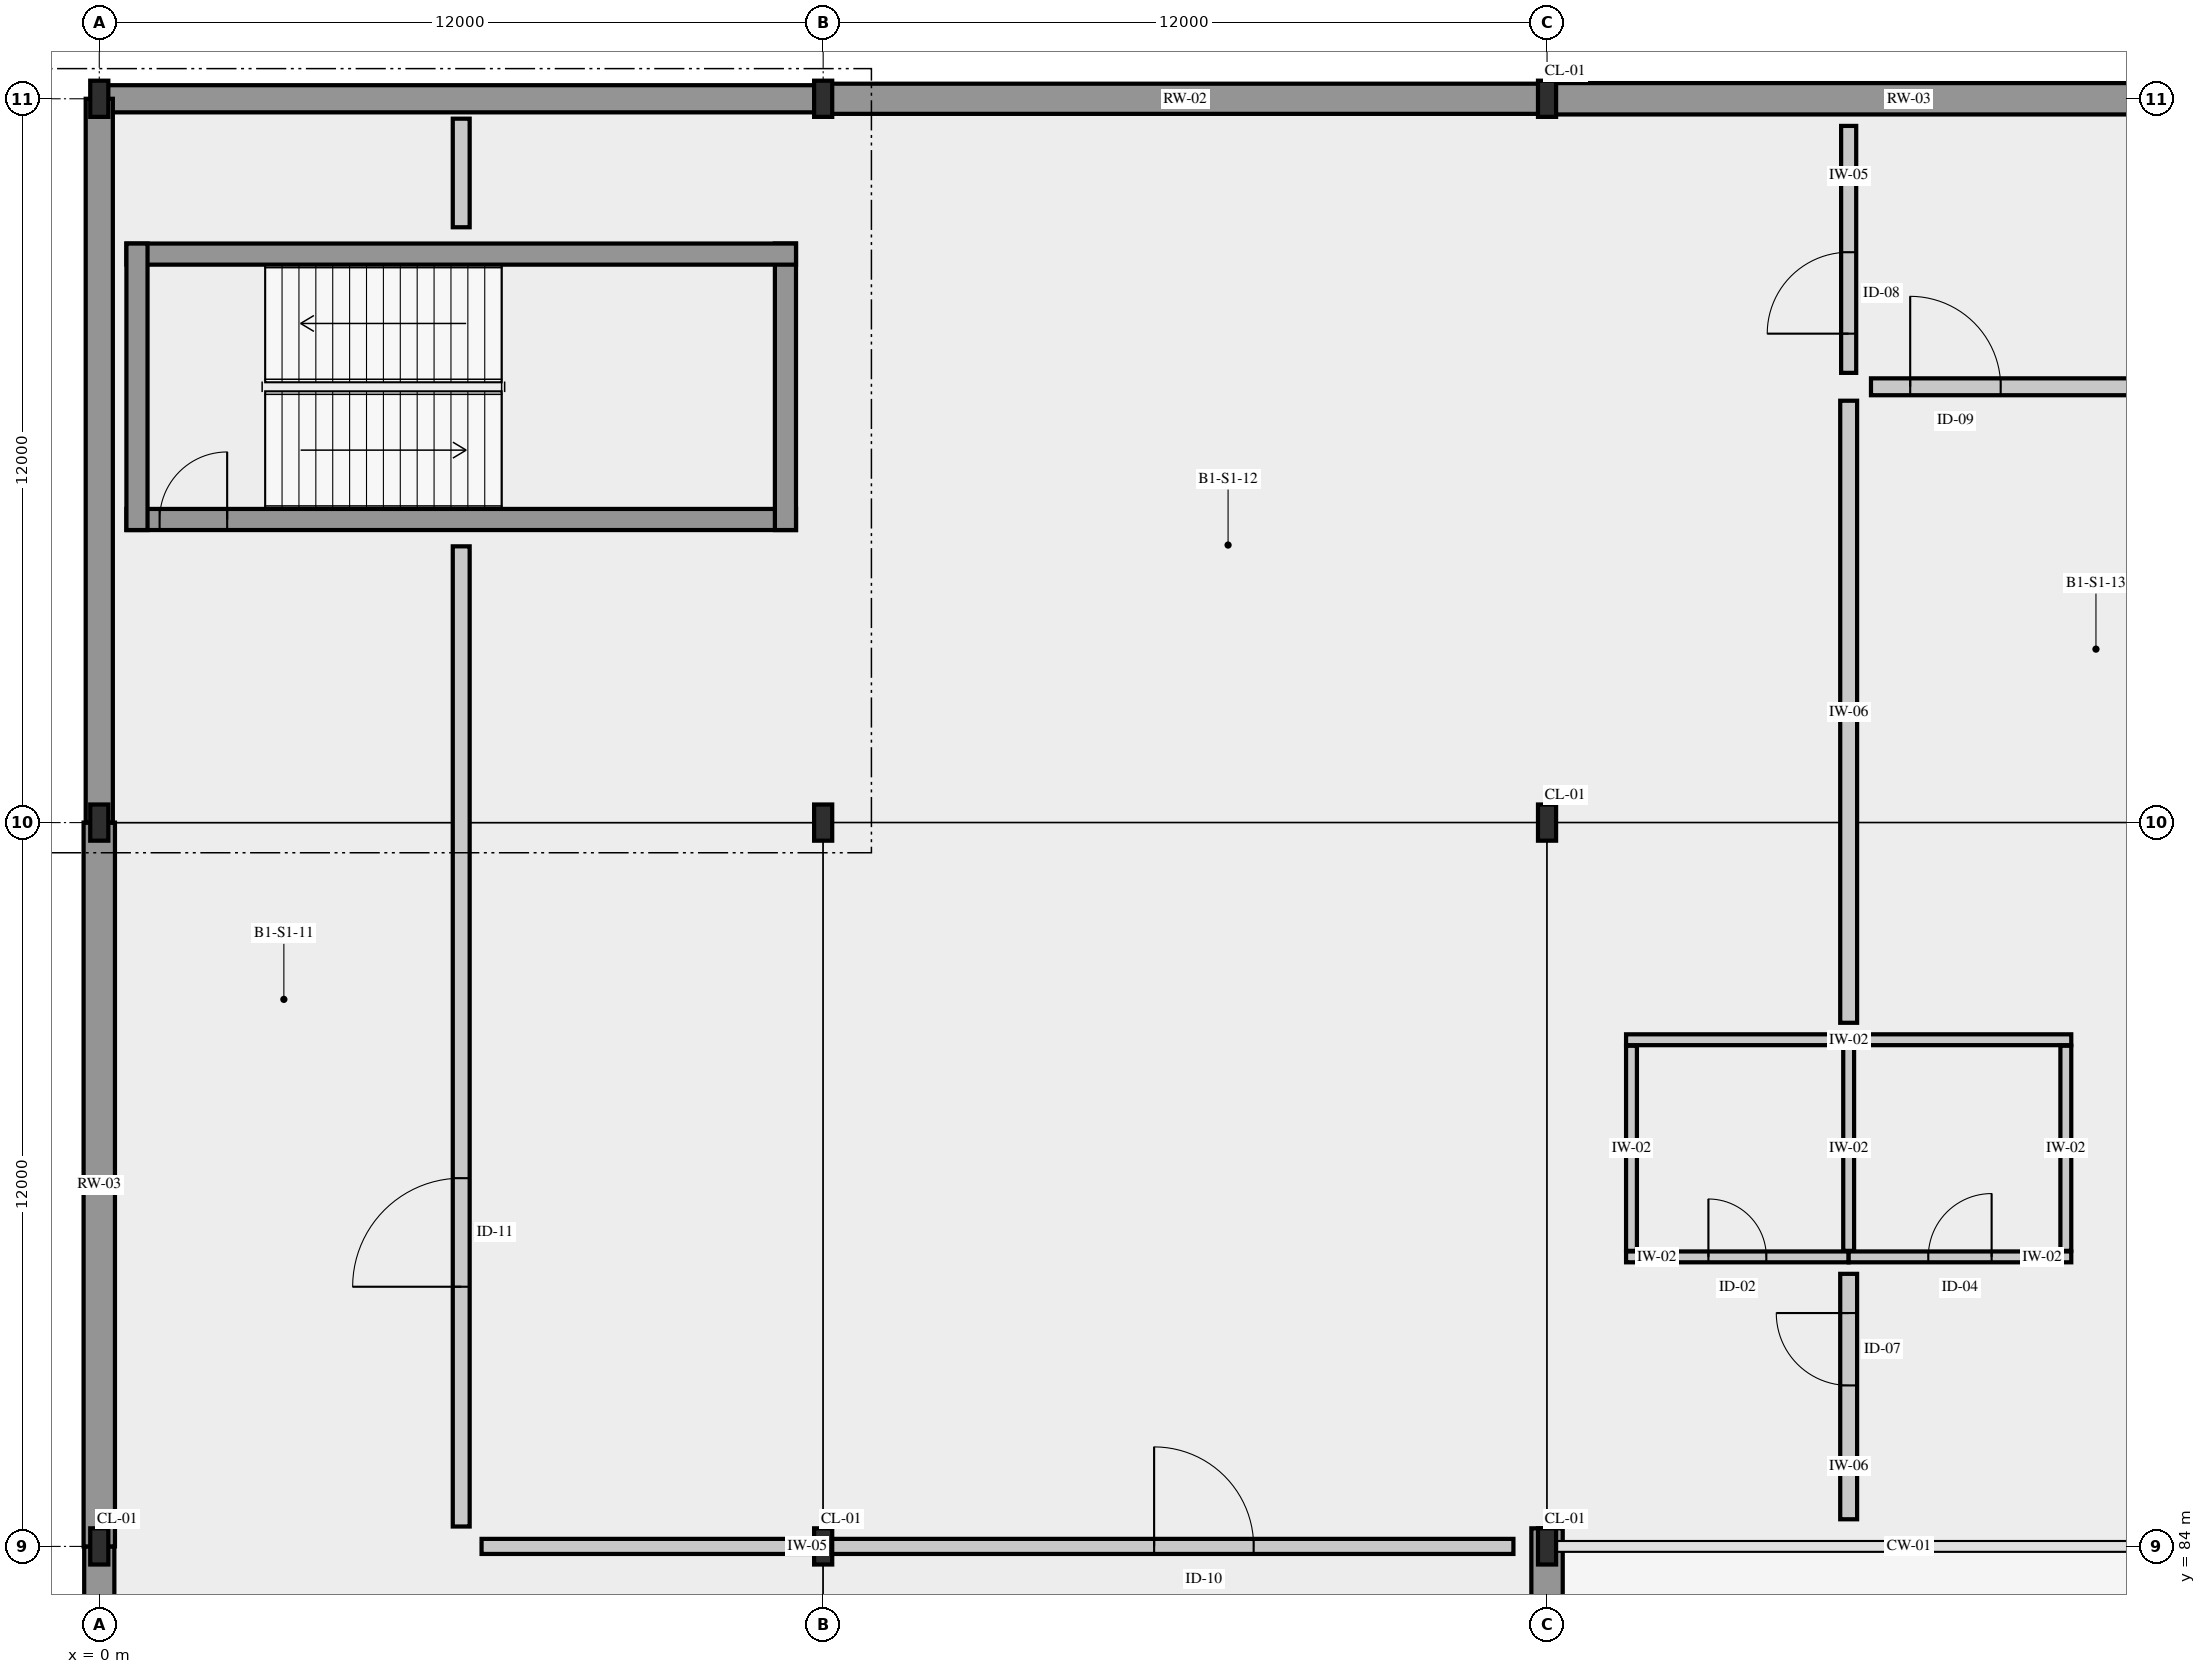
"""IFC4 building model, lengths in metres.
Left out: names, types, materials, properties, quantities, classifications, styles, units other than length and angle.
Written with IfcOpenShell. Run it as: python <this file> out.ifc"""

import sys

from ifc_helpers import new_model, si_unit, direction, frame, frame_2d, origin, origin_2d, place, context, subcontext, project, spatial, rectangle, i_section, extrude, element, fill, save


model = new_model("IFC4")
c1 = context("Model", 3, precision=1e-05, world=origin(), true_north=direction((0.0, 1.0)))
c2 = subcontext(c1, "Body", "Model", "MODEL_VIEW")
j1 = project(units=[si_unit("LENGTHUNIT", "METRE"), si_unit("PLANEANGLEUNIT", "RADIAN")], contexts=[c1])
p1 = place(None, origin())
s1 = spatial("IfcSite", under=j1, at=p1, CompositionType="ELEMENT")
p2 = place(p1, origin())
s2 = spatial("IfcBuilding", under=s1, at=p2, CompositionType="ELEMENT")
p3 = place(p2, frame((0.0, 0.0, -5.4)))
s3 = spatial("IfcBuildingStorey", under=s2, at=p3, CompositionType="ELEMENT", Elevation=-5.4)
for number, where, z_axis, x_axis in (
    (1, (0.0, 84.0, 0.0), (0.0, 0.0, 1.0), (1.0, 0.0, 0.0)),
    (2, (0.0, 96.0, 0.0), (0.0, 0.0, 1.0), (1.0, 0.0, 0.0)),
    (3, (0.0, 108.0, 0.0), (0.0, 0.0, 1.0), (1.0, 0.0, 0.0)),
    (4, (12.0, 84.0, 0.0), (0.0, 0.0, 1.0), (1.0, 0.0, 0.0)),
    (5, (12.0, 96.0, 0.0), (0.0, 0.0, 1.0), (1.0, 0.0, 0.0)),
    (6, (12.0, 108.0, 0.0), (0.0, 0.0, 1.0), (1.0, 0.0, 0.0)),
    (7, (24.0, 84.0, 0.0), (0.0, 0.0, 1.0), (1.0, 0.0, 0.0)),
    (8, (24.0, 96.0, 0.0), (0.0, 0.0, 1.0), (1.0, 0.0, 0.0)),
    (9, (24.0, 108.0, 0.0), (0.0, 0.0, 1.0), (1.0, 0.0, 0.0)),
):
    element("IfcColumn", number, at=place(p3, frame(where, z_axis=z_axis, x_axis=x_axis)), inside=s3, PredefinedType="COLUMN", context=c2, shape_type="SweptSolid", body=[
        extrude(i_section(OverallWidth=0.3, OverallDepth=0.6, WebThickness=0.015, FlangeThickness=0.03, FilletRadius=0.027, at=origin_2d()), origin(), (0.0, 0.0, 1.0), 5.4),
    ])
p4 = place(p3, frame((0.0, 84.0, 0.0), z_axis=(0.0, 0.0, 1.0), x_axis=(0.0, -1.0, 0.0)))
e10 = element("IfcWall", 10, at=p4, inside=s3, PredefinedType="USERDEFINED", context=c2, shape_type="SweptSolid", body=[
    extrude(rectangle(XDim=9.6, YDim=0.5, at=frame_2d((4.8, 0.0))), origin(), (0.0, 0.0, 1.0), 4.54),
])
p5 = place(p3, frame((0.0, 96.0, 0.0), z_axis=(0.0, 0.0, 1.0), x_axis=(0.0, -1.0, 0.0)))
e11 = element("IfcWall", 11, at=p5, inside=s3, PredefinedType="USERDEFINED", context=c2, shape_type="SweptSolid", body=[
    extrude(rectangle(XDim=12.0, YDim=0.52, at=frame_2d((6.0, 0.0))), origin(), (0.0, 0.0, 1.0), 4.54),
])
for number, where, z_axis, x_axis in (
    (12, (12.0, 108.0, 0.0), (0.0, 0.0, 1.0), (-1.0, 0.0, 0.0)),
    (13, (0.0, 108.0, 0.0), (0.0, 0.0, 1.0), (0.0, -1.0, 0.0)),
):
    element("IfcWall", number, at=place(p3, frame(where, z_axis=z_axis, x_axis=x_axis)), inside=s3, PredefinedType="USERDEFINED", context=c2, shape_type="SweptSolid", body=[
        extrude(rectangle(XDim=12.0, YDim=0.45, at=frame_2d((6.0, 0.0))), origin(), (0.0, 0.0, 1.0), 4.54),
    ])
p6 = place(p3, frame((24.0, 74.4, 0.0), z_axis=(0.0, 0.0, 1.0), x_axis=(0.0, 1.0, 0.0)))
e14 = element("IfcWall", 14, at=p6, inside=s3, PredefinedType="USERDEFINED", context=c2, shape_type="SweptSolid", body=[
    extrude(rectangle(XDim=9.9, YDim=0.52, at=frame_2d((4.95, 0.0))), origin(), (0.0, 0.0, 1.0), 4.54),
])
p7 = place(p3, frame((24.0, 108.0, 0.0), z_axis=(0.0, 0.0, 1.0), x_axis=(-1.0, 0.0, 0.0)))
e15 = element("IfcWall", 15, at=p7, inside=s3, PredefinedType="USERDEFINED", context=c2, shape_type="SweptSolid", body=[
    extrude(rectangle(XDim=12.0, YDim=0.5, at=frame_2d((6.0, 0.0))), origin(), (0.0, 0.0, 1.0), 4.54),
])
p8 = place(p3, frame((36.0, 108.0, 0.0), z_axis=(0.0, 0.0, 1.0), x_axis=(-1.0, 0.0, 0.0)))
e16 = element("IfcWall", 16, at=p8, inside=s3, PredefinedType="USERDEFINED", context=c2, shape_type="SweptSolid", body=[
    extrude(rectangle(XDim=12.0, YDim=0.52, at=frame_2d((6.0, 0.0))), origin(), (0.0, 0.0, 1.0), 4.54),
])
p9 = place(p3, frame((0.45, 101.025, 0.0), z_axis=(0.0, 0.0, 1.0), x_axis=(1.0, 0.0, 0.0)))
e17 = element("IfcWall", 17, at=p9, inside=s3, PredefinedType="SHEAR", context=c2, shape_type="SweptSolid", body=[
    extrude(rectangle(XDim=11.1, YDim=0.35, at=frame_2d((5.55, 0.0))), origin(), (0.0, 0.0, 1.0), 5.12),
])
p10 = place(p9, frame((0.55, 0.0, 0.0)))
e18 = element("IfcOpeningElement", 18, at=p10, cuts=e17, PredefinedType="OPENING", context=c2, shape_type="SweptSolid", body=[
    extrude(rectangle(XDim=1.12, YDim=2.2, at=frame_2d((0.56, 1.1))), frame((0.0, 0.185, 0.0), z_axis=(0.0, -1.0, 0.0), x_axis=(1.0, 0.0, 0.0)), (0.0, 0.0, 1.0), 0.37),
])
p11 = place(p3, frame((11.375, 100.85, 0.0), z_axis=(0.0, 0.0, 1.0), x_axis=(0.0, 1.0, 0.0)))
e19 = element("IfcWall", 19, at=p11, inside=s3, PredefinedType="SHEAR", context=c2, shape_type="SweptSolid", body=[
    extrude(rectangle(XDim=4.75, YDim=0.35, at=frame_2d((2.375, 0.0))), origin(), (0.0, 0.0, 1.0), 5.12),
])
p12 = place(p3, frame((11.55, 105.425, 0.0), z_axis=(0.0, 0.0, 1.0), x_axis=(-1.0, 0.0, 0.0)))
e20 = element("IfcWall", 20, at=p12, inside=s3, PredefinedType="SHEAR", context=c2, shape_type="SweptSolid", body=[
    extrude(rectangle(XDim=11.1, YDim=0.35, at=frame_2d((5.55, 0.0))), origin(), (0.0, 0.0, 1.0), 5.12),
])
p13 = place(p3, frame((0.625, 105.6, 0.0), z_axis=(0.0, 0.0, 1.0), x_axis=(0.0, -1.0, 0.0)))
e21 = element("IfcWall", 21, at=p13, inside=s3, PredefinedType="SHEAR", context=c2, shape_type="SweptSolid", body=[
    extrude(rectangle(XDim=4.75, YDim=0.35, at=frame_2d((2.375, 0.0))), origin(), (0.0, 0.0, 1.0), 5.12),
])
p14 = place(p3, frame((25.31, 92.4, 0.0), z_axis=(0.0, 0.0, 1.0), x_axis=(1.0, 0.0, 0.0)))
e22 = element("IfcWall", 22, at=p14, inside=s3, PredefinedType="PARTITIONING", context=c2, shape_type="SweptSolid", body=[
    extrude(rectangle(XDim=7.38, YDim=0.18, at=frame_2d((3.69, 0.0))), origin(), (0.0, 0.0, 1.0), 4.65),
])
p15 = place(p3, frame((25.31, 88.8, 0.0), z_axis=(0.0, 0.0, 1.0), x_axis=(1.0, 0.0, 0.0)))
e23 = element("IfcWall", 23, at=p15, inside=s3, PredefinedType="PARTITIONING", context=c2, shape_type="SweptSolid", body=[
    extrude(rectangle(XDim=3.69, YDim=0.18, at=frame_2d((1.845, 0.0))), origin(), (0.0, 0.0, 1.0), 4.65),
])
p16 = place(p15, frame((1.365, 0.0, 0.0)))
e24 = element("IfcOpeningElement", 24, at=p16, cuts=e23, PredefinedType="OPENING", context=c2, shape_type="SweptSolid", body=[
    extrude(rectangle(XDim=0.96, YDim=2.15, at=frame_2d((0.48, 1.075))), frame((0.0, 0.1, 0.0), z_axis=(0.0, -1.0, 0.0), x_axis=(1.0, 0.0, 0.0)), (0.0, 0.0, 1.0), 0.2),
])
p17 = place(p3, frame((29.0, 88.8, 0.0), z_axis=(0.0, 0.0, 1.0), x_axis=(1.0, 0.0, 0.0)))
e25 = element("IfcWall", 25, at=p17, inside=s3, PredefinedType="PARTITIONING", context=c2, shape_type="SweptSolid", body=[
    extrude(rectangle(XDim=3.69, YDim=0.18, at=frame_2d((1.845, 0.0))), origin(), (0.0, 0.0, 1.0), 4.65),
])
p18 = place(p17, frame((1.32, 0.0, 0.0)))
e26 = element("IfcOpeningElement", 26, at=p18, cuts=e25, PredefinedType="OPENING", context=c2, shape_type="SweptSolid", body=[
    extrude(rectangle(XDim=1.05, YDim=2.2, at=frame_2d((0.525, 1.1))), frame((0.0, 0.1, 0.0), z_axis=(0.0, -1.0, 0.0), x_axis=(1.0, 0.0, 0.0)), (0.0, 0.0, 1.0), 0.2),
])
for number, where, z_axis, x_axis in (
    (27, (25.4, 88.9, 0.0), (0.0, 0.0, 1.0), (0.0, 1.0, 0.0)),
    (28, (32.6, 88.9, 0.0), (0.0, 0.0, 1.0), (0.0, 1.0, 0.0)),
    (29, (29.0, 88.9, 0.0), (0.0, 0.0, 1.0), (0.0, 1.0, 0.0)),
):
    element("IfcWall", number, at=place(p3, frame(where, z_axis=z_axis, x_axis=x_axis)), inside=s3, PredefinedType="PARTITIONING", context=c2, shape_type="SweptSolid", body=[
        extrude(rectangle(XDim=3.4, YDim=0.18, at=frame_2d((1.7, 0.0))), origin(), (0.0, 0.0, 1.0), 4.65),
    ])
p19 = place(p3, frame((6.337, 84.0, 0.0), z_axis=(0.0, 0.0, 1.0), x_axis=(1.0, 0.0, 0.0)))
e30 = element("IfcWall", 30, at=p19, inside=s3, PredefinedType="SOLIDWALL", context=c2, shape_type="SweptSolid", body=[
    extrude(rectangle(XDim=17.105, YDim=0.25, at=frame_2d((8.553, 0.0))), origin(), (0.0, 0.0, 1.0), 4.47),
])
p20 = place(p19, frame((11.149, 0.0, 0.0)))
e31 = element("IfcOpeningElement", 31, at=p20, cuts=e30, PredefinedType="OPENING", context=c2, shape_type="SweptSolid", body=[
    extrude(rectangle(XDim=1.65, YDim=2.35, at=frame_2d((0.825, 1.175))), frame((0.0, 0.135, 0.0), z_axis=(0.0, -1.0, 0.0), x_axis=(1.0, 0.0, 0.0)), (0.0, 0.0, 1.0), 0.27),
])
p21 = place(p3, frame((6.0, 84.33, 0.0), z_axis=(0.0, 0.0, 1.0), x_axis=(0.0, 1.0, 0.0)))
e32 = element("IfcWall", 32, at=p21, inside=s3, PredefinedType="SOLIDWALL", context=c2, shape_type="SweptSolid", body=[
    extrude(rectangle(XDim=16.25, YDim=0.28, at=frame_2d((8.125, 0.0))), origin(), (0.0, 0.0, 1.0), 4.47),
])
p22 = place(p21, frame((3.975, 0.0, 0.0)))
e33 = element("IfcOpeningElement", 33, at=p22, cuts=e32, PredefinedType="OPENING", context=c2, shape_type="SweptSolid", body=[
    extrude(rectangle(XDim=1.8, YDim=2.4, at=frame_2d((0.9, 1.2))), frame((0.0, 0.15, 0.0), z_axis=(0.0, -1.0, 0.0), x_axis=(1.0, 0.0, 0.0)), (0.0, 0.0, 1.0), 0.3),
])
p23 = place(p3, frame((6.0, 105.87, 0.0), z_axis=(0.0, 0.0, 1.0), x_axis=(0.0, 1.0, 0.0)))
e34 = element("IfcWall", 34, at=p23, inside=s3, PredefinedType="SOLIDWALL", context=c2, shape_type="SweptSolid", body=[
    extrude(rectangle(XDim=1.8, YDim=0.28, at=frame_2d((0.9, 0.0))), origin(), (0.0, 0.0, 1.0), 5.1),
])
p24 = place(p3, frame((29.0, 84.45, 0.0), z_axis=(0.0, 0.0, 1.0), x_axis=(0.0, 1.0, 0.0)))
e35 = element("IfcWall", 35, at=p24, inside=s3, PredefinedType="SOLIDWALL", context=c2, shape_type="SweptSolid", body=[
    extrude(rectangle(XDim=4.069, YDim=0.28, at=frame_2d((2.035, 0.0))), origin(), (0.0, 0.0, 1.0), 4.65),
])
p25 = place(p24, frame((2.219, 0.0, 0.0)))
e36 = element("IfcOpeningElement", 36, at=p25, cuts=e35, PredefinedType="OPENING", context=c2, shape_type="SweptSolid", body=[
    extrude(rectangle(XDim=1.2, YDim=2.3, at=frame_2d((0.6, 1.15))), frame((0.0, 0.15, 0.0), z_axis=(0.0, -1.0, 0.0), x_axis=(1.0, 0.0, 0.0)), (0.0, 0.0, 1.0), 0.3),
])
p26 = place(p3, frame((29.0, 92.681, 0.0), z_axis=(0.0, 0.0, 1.0), x_axis=(0.0, 1.0, 0.0)))
e37 = element("IfcWall", 37, at=p26, inside=s3, PredefinedType="SOLIDWALL", context=c2, shape_type="SweptSolid", body=[
    extrude(rectangle(XDim=10.313, YDim=0.28, at=frame_2d((5.156, 0.0))), origin(), (0.0, 0.0, 1.0), 4.55),
])
p27 = place(p3, frame((29.0, 103.456, 0.0), z_axis=(0.0, 0.0, 1.0), x_axis=(0.0, 1.0, 0.0)))
e38 = element("IfcWall", 38, at=p27, inside=s3, PredefinedType="SOLIDWALL", context=c2, shape_type="SweptSolid", body=[
    extrude(rectangle(XDim=4.094, YDim=0.25, at=frame_2d((2.047, 0.0))), origin(), (0.0, 0.0, 1.0), 4.65),
])
p28 = place(p27, frame((0.65, 0.0, 0.0)))
e39 = element("IfcOpeningElement", 39, at=p28, cuts=e38, PredefinedType="OPENING", context=c2, shape_type="SweptSolid", body=[
    extrude(rectangle(XDim=1.35, YDim=2.3, at=frame_2d((0.675, 1.15))), frame((0.0, 0.135, 0.0), z_axis=(0.0, -1.0, 0.0), x_axis=(1.0, 0.0, 0.0)), (0.0, 0.0, 1.0), 0.27),
])
p29 = place(p3, frame((29.37, 103.225, 0.0), z_axis=(0.0, 0.0, 1.0), x_axis=(1.0, 0.0, 0.0)))
e40 = element("IfcWall", 40, at=p29, inside=s3, PredefinedType="SOLIDWALL", context=c2, shape_type="SweptSolid", body=[
    extrude(rectangle(XDim=6.81, YDim=0.28, at=frame_2d((3.405, 0.0))), origin(), (0.0, 0.0, 1.0), 4.61),
])
p30 = place(p29, frame((0.65, 0.0, 0.0)))
e41 = element("IfcOpeningElement", 41, at=p30, cuts=e40, PredefinedType="OPENING", context=c2, shape_type="SweptSolid", body=[
    extrude(rectangle(XDim=1.5, YDim=2.35, at=frame_2d((0.75, 1.175))), frame((0.0, 0.15, 0.0), z_axis=(0.0, -1.0, 0.0), x_axis=(1.0, 0.0, 0.0)), (0.0, 0.0, 1.0), 0.3),
])
p31 = place(p10, origin())
e42 = element("IfcDoor", 42, at=p31, inside=s3, OperationType="SINGLE_SWING_RIGHT", PredefinedType="DOOR", context=c2, shape_type="SweptSolid", body=[
    extrude(rectangle(XDim=1.12, YDim=2.2, at=frame_2d((0.56, 1.1))), frame((0.0, 0.025, 0.0), z_axis=(0.0, -1.0, 0.0), x_axis=(1.0, 0.0, 0.0)), (0.0, 0.0, 1.0), 0.05),
])
fill(e18, e42)
p32 = place(p16, origin())
e43 = element("IfcDoor", 43, at=p32, inside=s3, OperationType="SINGLE_SWING_LEFT", PredefinedType="DOOR", context=c2, shape_type="SweptSolid", body=[
    extrude(rectangle(XDim=0.96, YDim=2.15, at=frame_2d((0.48, 1.075))), frame((0.0, 0.025, 0.0), z_axis=(0.0, -1.0, 0.0), x_axis=(1.0, 0.0, 0.0)), (0.0, 0.0, 1.0), 0.05),
])
fill(e24, e43)
p33 = place(p18, origin())
e44 = element("IfcDoor", 44, at=p33, inside=s3, OperationType="SINGLE_SWING_RIGHT", PredefinedType="DOOR", context=c2, shape_type="SweptSolid", body=[
    extrude(rectangle(XDim=1.05, YDim=2.2, at=frame_2d((0.525, 1.1))), frame((0.0, 0.025, 0.0), z_axis=(0.0, -1.0, 0.0), x_axis=(1.0, 0.0, 0.0)), (0.0, 0.0, 1.0), 0.05),
])
fill(e26, e44)
p34 = place(p20, origin())
e45 = element("IfcDoor", 45, at=p34, inside=s3, OperationType="DOUBLE_DOOR_SINGLE_SWING", PredefinedType="DOOR", context=c2, shape_type="SweptSolid", body=[
    extrude(rectangle(XDim=1.65, YDim=2.35, at=frame_2d((0.825, 1.175))), frame((0.0, 0.025, 0.0), z_axis=(0.0, -1.0, 0.0), x_axis=(1.0, 0.0, 0.0)), (0.0, 0.0, 1.0), 0.05),
])
fill(e31, e45)
p35 = place(p22, origin())
e46 = element("IfcDoor", 46, at=p35, inside=s3, OperationType="DOUBLE_DOOR_SINGLE_SWING", PredefinedType="DOOR", context=c2, shape_type="SweptSolid", body=[
    extrude(rectangle(XDim=1.8, YDim=2.4, at=frame_2d((0.9, 1.2))), frame((0.0, 0.025, 0.0), z_axis=(0.0, -1.0, 0.0), x_axis=(1.0, 0.0, 0.0)), (0.0, 0.0, 1.0), 0.05),
])
fill(e33, e46)
p36 = place(p25, origin())
e47 = element("IfcDoor", 47, at=p36, inside=s3, OperationType="SINGLE_SWING_RIGHT", PredefinedType="DOOR", context=c2, shape_type="SweptSolid", body=[
    extrude(rectangle(XDim=1.2, YDim=2.3, at=frame_2d((0.6, 1.15))), frame((0.0, 0.025, 0.0), z_axis=(0.0, -1.0, 0.0), x_axis=(1.0, 0.0, 0.0)), (0.0, 0.0, 1.0), 0.05),
])
fill(e36, e47)
p37 = place(p28, origin())
e48 = element("IfcDoor", 48, at=p37, inside=s3, OperationType="DOUBLE_SWING_LEFT", PredefinedType="DOOR", context=c2, shape_type="SweptSolid", body=[
    extrude(rectangle(XDim=1.35, YDim=2.3, at=frame_2d((0.675, 1.15))), frame((0.0, 0.025, 0.0), z_axis=(0.0, -1.0, 0.0), x_axis=(1.0, 0.0, 0.0)), (0.0, 0.0, 1.0), 0.05),
])
fill(e39, e48)
p38 = place(p30, origin())
e49 = element("IfcDoor", 49, at=p38, inside=s3, OperationType="DOUBLE_DOOR_SINGLE_SWING", PredefinedType="DOOR", context=c2, shape_type="SweptSolid", body=[
    extrude(rectangle(XDim=1.5, YDim=2.35, at=frame_2d((0.75, 1.175))), frame((0.0, 0.025, 0.0), z_axis=(0.0, -1.0, 0.0), x_axis=(1.0, 0.0, 0.0)), (0.0, 0.0, 1.0), 0.05),
])
fill(e41, e49)
save(model, sys.argv[1])
